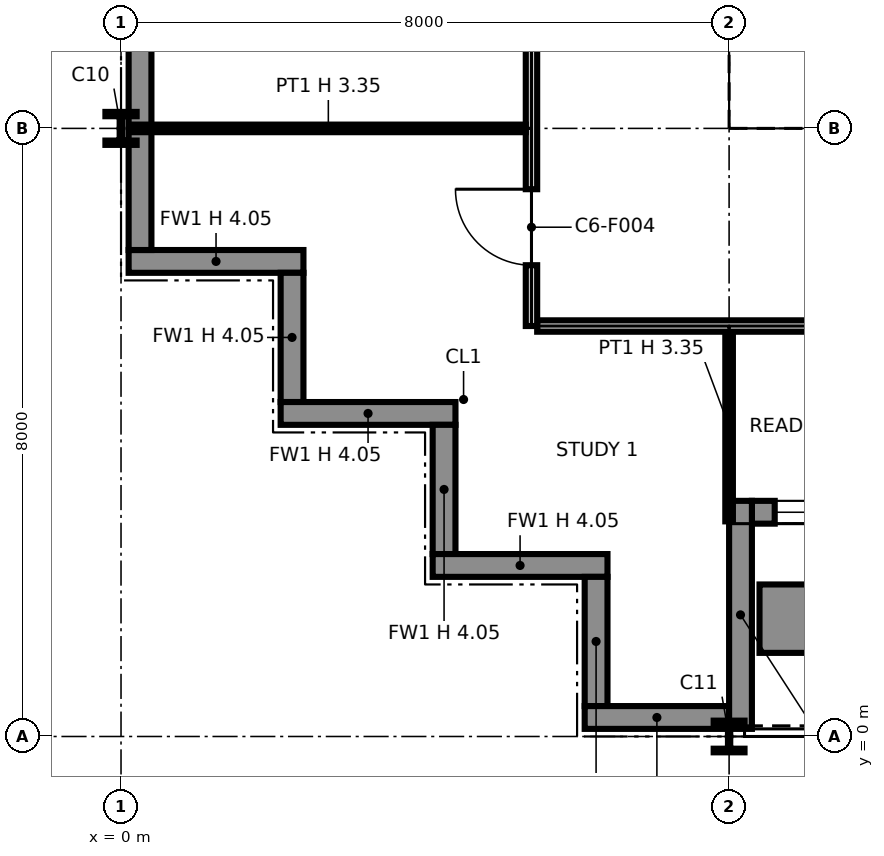
"""IFC4 building model, lengths in metres.
Left out: names, types, materials, properties, quantities, classifications, styles, units other than length and angle.
Written with IfcOpenShell. Run it as: python <this file> out.ifc"""

import sys

from ifc_helpers import new_model, si_unit, direction, frame, frame_2d, origin, origin_2d, place, context, subcontext, project, spatial, polyline, rectangle, i_section, outline, extrude, element, fill, save


model = new_model("IFC4")
c1 = context("Model", 3, precision=1e-05, world=origin(), true_north=direction((0.0, 1.0)))
c2 = subcontext(c1, "Body", "Model", "MODEL_VIEW")
j1 = project(units=[si_unit("LENGTHUNIT", "METRE"), si_unit("PLANEANGLEUNIT", "RADIAN")], contexts=[c1])
p1 = place(None, origin())
s1 = spatial("IfcSite", under=j1, at=p1, CompositionType="ELEMENT")
p2 = place(p1, origin())
s2 = spatial("IfcBuilding", under=s1, at=p2, CompositionType="ELEMENT")
p3 = place(p2, frame((0.0, 0.0, 174.6)))
s3 = spatial("IfcBuildingStorey", under=s2, at=p3, CompositionType="ELEMENT", Elevation=174.6)
p4 = place(p3, frame((0.0, 8.0, 0.0), z_axis=(0.0, 0.0, 1.0), x_axis=(1.0, 0.0, 0.0)))
e1 = element("IfcColumn", 1, at=p4, inside=s3, PredefinedType="COLUMN", context=c2, shape_type="SweptSolid", body=[
    extrude(i_section(OverallWidth=0.411, OverallDepth=0.434, WebThickness=0.036, FlangeThickness=0.057, at=origin_2d()), origin(), (0.0, 0.0, 1.0), 4.05),
])
p5 = place(p3, frame((8.0, 0.0, 0.0), z_axis=(0.0, 0.0, 1.0), x_axis=(1.0, 0.0, 0.0)))
e2 = element("IfcColumn", 2, at=p5, inside=s3, PredefinedType="COLUMN", context=c2, shape_type="SweptSolid", body=[
    extrude(i_section(OverallWidth=0.406, OverallDepth=0.417, WebThickness=0.03, FlangeThickness=0.048, at=origin_2d()), origin(), (0.0, 0.0, 1.0), 4.05),
])
p6 = place(p3, frame((8.0, 8.0, 0.0), z_axis=(0.0, 0.0, 1.0), x_axis=(1.0, 0.0, 0.0)))
e3 = element("IfcColumn", 3, at=p6, inside=s3, PredefinedType="COLUMN", context=c2, shape_type="SweptSolid", body=[
    extrude(i_section(OverallWidth=0.399, OverallDepth=0.386, WebThickness=0.021, FlangeThickness=0.033, at=origin_2d()), origin(), (0.0, 0.0, 1.0), 4.05),
])
p7 = place(p3, frame((0.1, 6.25, 0.0), z_axis=(0.0, 0.0, 1.0), x_axis=(1.0, 0.0, 0.0)))
e4 = element("IfcWall", 4, at=p7, inside=s3, PredefinedType="SOLIDWALL", context=c2, shape_type="SweptSolid", body=[
    extrude(rectangle(XDim=2.3, YDim=0.3, at=frame_2d((1.15, 0.0))), origin(), (0.0, 0.0, 1.0), 4.05),
])
p8 = place(p3, frame((2.25, 6.1, 0.0), z_axis=(0.0, 0.0, 1.0), x_axis=(0.0, -1.0, 0.0)))
e5 = element("IfcWall", 5, at=p8, inside=s3, PredefinedType="SOLIDWALL", context=c2, shape_type="SweptSolid", body=[
    extrude(rectangle(XDim=1.7, YDim=0.3, at=frame_2d((0.85, 0.0))), origin(), (0.0, 0.0, 1.0), 4.05),
])
p9 = place(p3, frame((2.1, 4.25, 0.0), z_axis=(0.0, 0.0, 1.0), x_axis=(1.0, 0.0, 0.0)))
e6 = element("IfcWall", 6, at=p9, inside=s3, PredefinedType="SOLIDWALL", context=c2, shape_type="SweptSolid", body=[
    extrude(rectangle(XDim=2.3, YDim=0.3, at=frame_2d((1.15, 0.0))), origin(), (0.0, 0.0, 1.0), 4.05),
])
p10 = place(p3, frame((4.25, 4.1, 0.0), z_axis=(0.0, 0.0, 1.0), x_axis=(0.0, -1.0, 0.0)))
e7 = element("IfcWall", 7, at=p10, inside=s3, PredefinedType="SOLIDWALL", context=c2, shape_type="SweptSolid", body=[
    extrude(rectangle(XDim=1.7, YDim=0.3, at=frame_2d((0.85, 0.0))), origin(), (0.0, 0.0, 1.0), 4.05),
])
p11 = place(p3, frame((4.1, 2.25, 0.0), z_axis=(0.0, 0.0, 1.0), x_axis=(1.0, 0.0, 0.0)))
e8 = element("IfcWall", 8, at=p11, inside=s3, PredefinedType="SOLIDWALL", context=c2, shape_type="SweptSolid", body=[
    extrude(rectangle(XDim=2.3, YDim=0.3, at=frame_2d((1.15, 0.0))), origin(), (0.0, 0.0, 1.0), 4.05),
])
p12 = place(p3, frame((6.25, 2.1, 0.0), z_axis=(0.0, 0.0, 1.0), x_axis=(0.0, -1.0, 0.0)))
e9 = element("IfcWall", 9, at=p12, inside=s3, PredefinedType="SOLIDWALL", context=c2, shape_type="SweptSolid", body=[
    extrude(rectangle(XDim=1.7, YDim=0.3, at=frame_2d((0.85, 0.0))), origin(), (0.0, 0.0, 1.0), 4.05),
])
p13 = place(p3, frame((6.1, 0.25, 0.0), z_axis=(0.0, 0.0, 1.0), x_axis=(1.0, 0.0, 0.0)))
e10 = element("IfcWall", 10, at=p13, inside=s3, PredefinedType="SOLIDWALL", context=c2, shape_type="SweptSolid", body=[
    extrude(rectangle(XDim=1.9, YDim=0.3, at=frame_2d((0.95, 0.0))), origin(), (0.0, 0.0, 1.0), 4.05),
])
p14 = place(p3, frame((8.3, 2.95, 0.0), z_axis=(0.0, 0.0, 1.0), x_axis=(1.0, 0.0, 0.0)))
e11 = element("IfcWall", 11, at=p14, inside=s3, PredefinedType="SOLIDWALL", context=c2, shape_type="SweptSolid", body=[
    extrude(rectangle(XDim=7.4, YDim=0.3, at=frame_2d((3.7, 0.0))), origin(), (0.0, 0.0, 1.0), 4.05),
])
p15 = place(p14, frame((0.3, 0.0, 0.9)))
e12 = element("IfcOpeningElement", 12, at=p15, cuts=e11, PredefinedType="OPENING", context=c2, shape_type="SweptSolid", body=[
    extrude(rectangle(XDim=2.8, YDim=2.2, at=frame_2d((1.4, 1.1))), frame((0.0, 0.16, 0.0), z_axis=(0.0, -1.0, 0.0), x_axis=(1.0, 0.0, 0.0)), (0.0, 0.0, 1.0), 0.32),
])
p16 = place(p14, frame((4.7, 0.0, 0.0)))
e13 = element("IfcOpeningElement", 13, at=p16, cuts=e11, PredefinedType="OPENING", context=c2, shape_type="SweptSolid", body=[
    extrude(rectangle(XDim=2.0, YDim=2.4, at=frame_2d((1.0, 1.2))), frame((0.0, 0.16, 0.0), z_axis=(0.0, -1.0, 0.0), x_axis=(1.0, 0.0, 0.0)), (0.0, 0.0, 1.0), 0.32),
])
p17 = place(p3, frame((8.15, 0.1, 0.0), z_axis=(0.0, 0.0, 1.0), x_axis=(0.0, 1.0, 0.0)))
e14 = element("IfcWall", 14, at=p17, inside=s3, PredefinedType="SOLIDWALL", context=c2, shape_type="SweptSolid", body=[
    extrude(rectangle(XDim=3.0, YDim=0.3, at=frame_2d((1.5, 0.0))), origin(), (0.0, 0.0, 1.0), 3.353),
])
p18 = place(p3, frame((8.4, 1.55, 0.0), z_axis=(0.0, 0.0, 1.0), x_axis=(1.0, 0.0, 0.0)))
e15 = element("IfcWall", 15, at=p18, inside=s3, PredefinedType="SOLIDWALL", context=c2, shape_type="SweptSolid", body=[
    extrude(rectangle(XDim=3.2, YDim=0.9, at=frame_2d((1.6, 0.0))), origin(), (0.0, 0.0, 1.0), 0.6),
])
p19 = place(p3, frame((0.25, 16.0, 0.0), z_axis=(0.0, 0.0, 1.0), x_axis=(0.0, -1.0, 0.0)))
e16 = element("IfcWall", 16, at=p19, inside=s3, PredefinedType="SOLIDWALL", context=c2, shape_type="SweptSolid", body=[
    extrude(rectangle(XDim=9.6, YDim=0.3, at=frame_2d((4.8, 0.0))), origin(), (0.0, 0.0, 1.0), 4.05),
])
p20 = place(p3, frame((8.65, 8.75, 0.0), z_axis=(0.0, 0.0, 1.0), x_axis=(1.0, 0.0, 0.0)))
e17 = element("IfcWall", 17, at=p20, inside=s3, PredefinedType="PARTITIONING", context=c2, shape_type="SweptSolid", body=[
    extrude(outline(polyline([(0.0, 0.0), (14.7, 0.0), (14.7, 4.05), (7.469, 4.05), (7.468, 3.442), (7.232, 3.442), (7.231, 4.05), (0.0, 4.05), (0.0, 0.0)])), frame((0.0, 0.1, 0.0), z_axis=(0.0, -1.0, 0.0), x_axis=(1.0, 0.0, 0.0)), (0.0, 0.0, 1.0), 0.2),
])
p21 = place(p20, frame((1.3, 0.0, 0.0)))
e18 = element("IfcOpeningElement", 18, at=p21, cuts=e17, PredefinedType="OPENING", context=c2, shape_type="SweptSolid", body=[
    extrude(rectangle(XDim=1.4, YDim=2.1, at=frame_2d((0.7, 1.05))), frame((0.0, 0.11, 0.0), z_axis=(0.0, -1.0, 0.0), x_axis=(1.0, 0.0, 0.0)), (0.0, 0.0, 1.0), 0.22),
])
p22 = place(p20, frame((4.6, 0.0, 0.0)))
e19 = element("IfcOpeningElement", 19, at=p22, cuts=e17, PredefinedType="OPENING", context=c2, shape_type="SweptSolid", body=[
    extrude(rectangle(XDim=1.4, YDim=2.1, at=frame_2d((0.7, 1.05))), frame((0.0, 0.11, 0.0), z_axis=(0.0, -1.0, 0.0), x_axis=(1.0, 0.0, 0.0)), (0.0, 0.0, 1.0), 0.22),
])
p23 = place(p20, frame((10.4, 0.0, 0.0)))
e20 = element("IfcOpeningElement", 20, at=p23, cuts=e17, PredefinedType="OPENING", context=c2, shape_type="SweptSolid", body=[
    extrude(rectangle(XDim=1.2, YDim=2.1, at=frame_2d((0.6, 1.05))), frame((0.0, 0.11, 0.0), z_axis=(0.0, -1.0, 0.0), x_axis=(1.0, 0.0, 0.0)), (0.0, 0.0, 1.0), 0.22),
])
p24 = place(p3, frame((8.75, 8.85, 0.0), z_axis=(0.0, 0.0, 1.0), x_axis=(0.0, 1.0, 0.0)))
e21 = element("IfcWall", 21, at=p24, inside=s3, PredefinedType="PARTITIONING", context=c2, shape_type="SweptSolid", body=[
    extrude(outline(polyline([(0.0, 0.0), (14.3, 0.0), (14.3, 4.05), (11.231, 4.05), (11.23, 3.589), (11.07, 3.589), (11.069, 4.05), (7.269, 4.05), (7.268, 3.442), (7.032, 3.442), (7.031, 4.05), (0.0, 4.05), (0.0, 0.0)])), frame((0.0, 0.1, 0.0), z_axis=(0.0, -1.0, 0.0), x_axis=(1.0, 0.0, 0.0)), (0.0, 0.0, 1.0), 0.2),
])
p25 = place(p24, frame((8.3, 0.0, 0.0)))
e22 = element("IfcOpeningElement", 22, at=p25, cuts=e21, PredefinedType="OPENING", context=c2, shape_type="SweptSolid", body=[
    extrude(rectangle(XDim=1.8, YDim=2.1, at=frame_2d((0.9, 1.05))), frame((0.0, 0.11, 0.0), z_axis=(0.0, -1.0, 0.0), x_axis=(1.0, 0.0, 0.0)), (0.0, 0.0, 1.0), 0.22),
])
p26 = place(p3, frame((8.0, 2.83, 0.0), z_axis=(0.0, 0.0, 1.0), x_axis=(0.0, 1.0, 0.0)))
e23 = element("IfcWall", 23, at=p26, inside=s3, PredefinedType="PARTITIONING", context=c2, shape_type="SweptSolid", body=[
    extrude(rectangle(XDim=2.495, YDim=0.1, at=frame_2d((1.248, 0.0))), origin(), (0.0, 0.0, 1.0), 3.354),
])
p27 = place(p3, frame((5.475, 5.4, 0.0), z_axis=(0.0, 0.0, 1.0), x_axis=(1.0, 0.0, 0.0)))
e24 = element("IfcWall", 24, at=p27, inside=s3, PredefinedType="PARTITIONING", context=c2, shape_type="SweptSolid", body=[
    extrude(rectangle(XDim=21.05, YDim=0.15, at=frame_2d((10.525, 0.0))), origin(), (0.0, 0.0, 1.0), 4.05),
])
p28 = place(p27, frame((13.025, 0.0, 0.0), z_axis=(0.0, 0.0, 1.0), x_axis=(-1.0, 0.0, 0.0)))
e25 = element("IfcOpeningElement", 25, at=p28, cuts=e24, PredefinedType="OPENING", context=c2, shape_type="SweptSolid", body=[
    extrude(rectangle(XDim=1.0, YDim=2.1, at=frame_2d((0.5, 1.05))), frame((0.0, 0.085, 0.0), z_axis=(0.0, -1.0, 0.0), x_axis=(1.0, 0.0, 0.0)), (0.0, 0.0, 1.0), 0.17),
])
p29 = place(p27, frame((17.025, 0.0, 0.0), z_axis=(0.0, 0.0, 1.0), x_axis=(-1.0, 0.0, 0.0)))
e26 = element("IfcOpeningElement", 26, at=p29, cuts=e24, PredefinedType="OPENING", context=c2, shape_type="SweptSolid", body=[
    extrude(rectangle(XDim=1.0, YDim=2.1, at=frame_2d((0.5, 1.05))), frame((0.0, 0.085, 0.0), z_axis=(0.0, -1.0, 0.0), x_axis=(1.0, 0.0, 0.0)), (0.0, 0.0, 1.0), 0.17),
])
p30 = place(p27, frame((7.025, 0.0, 0.0), z_axis=(0.0, 0.0, 1.0), x_axis=(-1.0, 0.0, 0.0)))
e27 = element("IfcOpeningElement", 27, at=p30, cuts=e24, PredefinedType="OPENING", context=c2, shape_type="SweptSolid", body=[
    extrude(rectangle(XDim=1.0, YDim=2.1, at=frame_2d((0.5, 1.05))), frame((0.0, 0.085, 0.0), z_axis=(0.0, -1.0, 0.0), x_axis=(1.0, 0.0, 0.0)), (0.0, 0.0, 1.0), 0.17),
])
p31 = place(p27, frame((18.925, 0.0, 0.0)))
e28 = element("IfcOpeningElement", 28, at=p31, cuts=e24, PredefinedType="OPENING", context=c2, shape_type="SweptSolid", body=[
    extrude(rectangle(XDim=1.8, YDim=2.1, at=frame_2d((0.9, 1.05))), frame((0.0, 0.085, 0.0), z_axis=(0.0, -1.0, 0.0), x_axis=(1.0, 0.0, 0.0)), (0.0, 0.0, 1.0), 0.17),
])
p32 = place(p3, frame((5.4, 5.4, 0.0), z_axis=(0.0, 0.0, 1.0), x_axis=(0.0, 1.0, 0.0)))
e29 = element("IfcWall", 29, at=p32, inside=s3, PredefinedType="PARTITIONING", context=c2, shape_type="SweptSolid", body=[
    extrude(outline(polyline([(0.0, 0.0), (37.125, 0.0), (37.125, 4.05), (34.9, 4.05), (34.898, 3.354), (34.302, 3.354), (34.3, 4.05), (30.9, 4.05), (30.898, 3.354), (30.302, 3.354), (30.3, 4.05), (26.9, 4.05), (26.898, 3.354), (26.302, 3.354), (26.3, 4.05), (22.9, 4.05), (22.898, 3.354), (22.302, 3.354), (22.3, 4.05), (18.9, 4.05), (18.898, 3.354), (18.302, 3.354), (18.3, 4.05), (14.9, 4.05), (14.898, 3.354), (14.302, 3.354), (14.3, 4.05), (10.9, 4.05), (10.898, 3.354), (10.302, 3.354), (10.3, 4.05), (6.9, 4.05), (6.898, 3.354), (6.302, 3.354), (6.3, 4.05), (2.9, 4.05), (2.898, 3.354), (2.302, 3.354), (2.3, 4.05), (0.0, 4.05), (0.0, 0.0)])), frame((0.0, 0.075, 0.0), z_axis=(0.0, -1.0, 0.0), x_axis=(1.0, 0.0, 0.0)), (0.0, 0.0, 1.0), 0.15),
])
p33 = place(p32, frame((0.8, 0.0, 0.0)))
e30 = element("IfcOpeningElement", 30, at=p33, cuts=e29, PredefinedType="OPENING", context=c2, shape_type="SweptSolid", body=[
    extrude(rectangle(XDim=1.0, YDim=2.1, at=frame_2d((0.5, 1.05))), frame((0.0, 0.085, 0.0), z_axis=(0.0, -1.0, 0.0), x_axis=(1.0, 0.0, 0.0)), (0.0, 0.0, 1.0), 0.17),
])
p34 = place(p32, frame((6.1, 0.0, 0.0)))
e31 = element("IfcOpeningElement", 31, at=p34, cuts=e29, PredefinedType="OPENING", context=c2, shape_type="SweptSolid", body=[
    extrude(rectangle(XDim=1.0, YDim=2.1, at=frame_2d((0.5, 1.05))), frame((0.0, 0.085, 0.0), z_axis=(0.0, -1.0, 0.0), x_axis=(1.0, 0.0, 0.0)), (0.0, 0.0, 1.0), 0.17),
])
p35 = place(p32, frame((11.825, 0.0, 0.0)))
e32 = element("IfcOpeningElement", 32, at=p35, cuts=e29, PredefinedType="OPENING", context=c2, shape_type="SweptSolid", body=[
    extrude(rectangle(XDim=1.0, YDim=2.1, at=frame_2d((0.5, 1.05))), frame((0.0, 0.085, 0.0), z_axis=(0.0, -1.0, 0.0), x_axis=(1.0, 0.0, 0.0)), (0.0, 0.0, 1.0), 0.17),
])
p36 = place(p32, frame((16.1, 0.0, 0.0)))
e33 = element("IfcOpeningElement", 33, at=p36, cuts=e29, PredefinedType="OPENING", context=c2, shape_type="SweptSolid", body=[
    extrude(rectangle(XDim=1.0, YDim=2.1, at=frame_2d((0.5, 1.05))), frame((0.0, 0.085, 0.0), z_axis=(0.0, -1.0, 0.0), x_axis=(1.0, 0.0, 0.0)), (0.0, 0.0, 1.0), 0.17),
])
p37 = place(p32, frame((20.8, 0.0, 0.0)))
e34 = element("IfcOpeningElement", 34, at=p37, cuts=e29, PredefinedType="OPENING", context=c2, shape_type="SweptSolid", body=[
    extrude(rectangle(XDim=1.0, YDim=2.1, at=frame_2d((0.5, 1.05))), frame((0.0, 0.085, 0.0), z_axis=(0.0, -1.0, 0.0), x_axis=(1.0, 0.0, 0.0)), (0.0, 0.0, 1.0), 0.17),
])
p38 = place(p32, frame((28.1, 0.0, 0.0)))
e35 = element("IfcOpeningElement", 35, at=p38, cuts=e29, PredefinedType="OPENING", context=c2, shape_type="SweptSolid", body=[
    extrude(rectangle(XDim=1.0, YDim=2.1, at=frame_2d((0.5, 1.05))), frame((0.0, 0.085, 0.0), z_axis=(0.0, -1.0, 0.0), x_axis=(1.0, 0.0, 0.0)), (0.0, 0.0, 1.0), 0.17),
])
p39 = place(p32, frame((32.1, 0.0, 0.0)))
e36 = element("IfcOpeningElement", 36, at=p39, cuts=e29, PredefinedType="OPENING", context=c2, shape_type="SweptSolid", body=[
    extrude(rectangle(XDim=1.0, YDim=2.1, at=frame_2d((0.5, 1.05))), frame((0.0, 0.085, 0.0), z_axis=(0.0, -1.0, 0.0), x_axis=(1.0, 0.0, 0.0)), (0.0, 0.0, 1.0), 0.17),
])
p40 = place(p32, frame((35.4, 0.0, 0.0)))
e37 = element("IfcOpeningElement", 37, at=p40, cuts=e29, PredefinedType="OPENING", context=c2, shape_type="SweptSolid", body=[
    extrude(rectangle(XDim=1.0, YDim=2.1, at=frame_2d((0.5, 1.05))), frame((0.0, 0.085, 0.0), z_axis=(0.0, -1.0, 0.0), x_axis=(1.0, 0.0, 0.0)), (0.0, 0.0, 1.0), 0.17),
])
p41 = place(p3, frame((0.13, 8.0, 0.0), z_axis=(0.0, 0.0, 1.0), x_axis=(1.0, 0.0, 0.0)))
e38 = element("IfcWall", 38, at=p41, inside=s3, PredefinedType="PARTITIONING", context=c2, shape_type="SweptSolid", body=[
    extrude(rectangle(XDim=5.195, YDim=0.1, at=frame_2d((2.598, 0.0))), origin(), (0.0, 0.0, 1.0), 3.354),
])
p42 = place(p15, origin())
e39 = element("IfcWindow", 39, at=p42, inside=s3, PartitioningType="SINGLE_PANEL", PredefinedType="WINDOW", context=c2, shape_type="SweptSolid", body=[
    extrude(rectangle(XDim=2.8, YDim=2.2, at=frame_2d((1.4, 1.1))), frame((0.0, 0.03, 0.0), z_axis=(0.0, -1.0, 0.0), x_axis=(1.0, 0.0, 0.0)), (0.0, 0.0, 1.0), 0.06),
])
fill(e12, e39)
p43 = place(p33, origin())
e40 = element("IfcDoor", 40, at=p43, inside=s3, OperationType="SINGLE_SWING_RIGHT", PredefinedType="DOOR", context=c2, shape_type="SweptSolid", body=[
    extrude(rectangle(XDim=1.0, YDim=2.1, at=frame_2d((0.5, 1.05))), frame((0.0, 0.025, 0.0), z_axis=(0.0, -1.0, 0.0), x_axis=(1.0, 0.0, 0.0)), (0.0, 0.0, 1.0), 0.05),
])
fill(e30, e40)
save(model, sys.argv[1])
